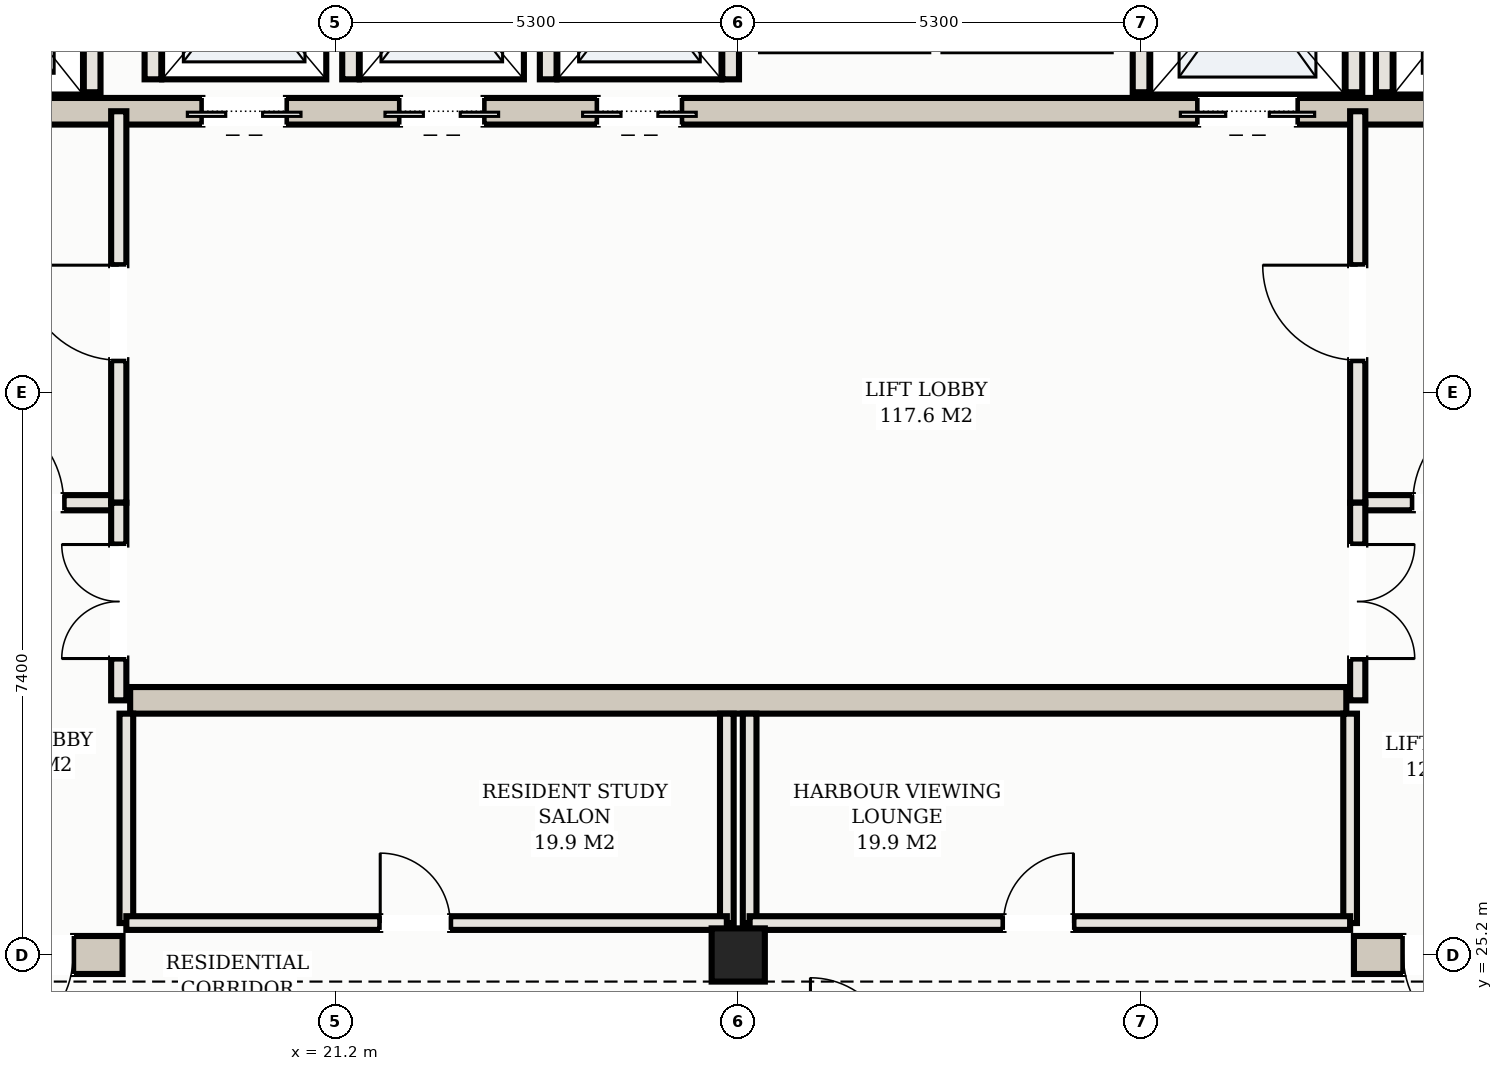
"""IFC4 building model, lengths in metres.
Left out: names, types, materials, properties, quantities, classifications, styles, units other than length and angle.
Written with IfcOpenShell. Run it as: python <this file> out.ifc"""

import sys

from ifc_helpers import new_model, si_unit, direction, frame, frame_2d, origin, origin_2d, place, context, subcontext, project, spatial, rectangle, hollow_rectangle, extrude, element, fill, save


model = new_model("IFC4")
c1 = context("Model", 3, precision=1e-05, world=origin(), true_north=direction((0.0, 1.0)))
c2 = subcontext(c1, "Body", "Model", "MODEL_VIEW")
j1 = project(units=[si_unit("LENGTHUNIT", "METRE"), si_unit("PLANEANGLEUNIT", "RADIAN")], contexts=[c1])
p1 = place(None, origin())
s1 = spatial("IfcSite", under=j1, at=p1, CompositionType="ELEMENT")
p2 = place(p1, origin())
s2 = spatial("IfcBuilding", under=s1, at=p2, CompositionType="ELEMENT")
p3 = place(p2, frame((0.0, 0.0, 249.5)))
s3 = spatial("IfcBuildingStorey", under=s2, at=p3, CompositionType="ELEMENT", Elevation=249.5)
p4 = place(p3, frame((10.35, 25.2, 0.0), z_axis=(0.0, 0.0, 1.0), x_axis=(1.0, 0.0, 0.0)))
e1 = element("IfcWall", 1, at=p4, inside=s3, PredefinedType="SHEAR", context=c2, shape_type="SweptSolid", body=[
    extrude(rectangle(XDim=8.05, YDim=0.5, at=frame_2d((4.025, 0.0))), origin(), (0.0, 0.0, 1.0), 3.11),
])
p5 = place(p4, frame((6.15, 0.0, 0.0)))
e2 = element("IfcOpeningElement", 2, at=p5, cuts=e1, PredefinedType="OPENING", context=c2, shape_type="SweptSolid", body=[
    extrude(rectangle(XDim=1.25, YDim=2.2, at=frame_2d((0.625, 1.1))), frame((0.0, 0.26, 0.0), z_axis=(0.0, -1.0, 0.0), x_axis=(1.0, 0.0, 0.0)), (0.0, 0.0, 1.0), 0.52),
])
p6 = place(p3, frame((34.6, 25.2, 0.0), z_axis=(0.0, 0.0, 1.0), x_axis=(1.0, 0.0, 0.0)))
e3 = element("IfcWall", 3, at=p6, inside=s3, PredefinedType="SHEAR", context=c2, shape_type="SweptSolid", body=[
    extrude(rectangle(XDim=8.05, YDim=0.5, at=frame_2d((4.025, 0.0))), origin(), (0.0, 0.0, 1.0), 3.11),
])
p7 = place(p6, frame((0.65, 0.0, 0.0)))
e4 = element("IfcOpeningElement", 4, at=p7, cuts=e3, PredefinedType="OPENING", context=c2, shape_type="SweptSolid", body=[
    extrude(rectangle(XDim=1.25, YDim=2.2, at=frame_2d((0.625, 1.1))), frame((0.0, 0.26, 0.0), z_axis=(0.0, -1.0, 0.0), x_axis=(1.0, 0.0, 0.0)), (0.0, 0.0, 1.0), 0.52),
])
p8 = place(p3, frame((15.5, 36.3, 0.0), z_axis=(0.0, 0.0, 1.0), x_axis=(1.0, 0.0, 0.0)))
e5 = element("IfcWall", 5, at=p8, inside=s3, PredefinedType="SHEAR", context=c2, shape_type="SweptSolid", body=[
    extrude(rectangle(XDim=22.0, YDim=0.35, at=frame_2d((11.0, 0.0))), origin(), (0.0, 0.0, 1.0), 3.11),
])
p9 = place(p8, frame((0.65, 0.0, 0.0)))
e6 = element("IfcOpeningElement", 6, at=p9, cuts=e5, PredefinedType="OPENING", context=c2, shape_type="SweptSolid", body=[
    extrude(rectangle(XDim=1.1, YDim=2.15, at=frame_2d((0.55, 1.075))), frame((0.0, 0.185, 0.0), z_axis=(0.0, -1.0, 0.0), x_axis=(1.0, 0.0, 0.0)), (0.0, 0.0, 1.0), 0.37),
])
p10 = place(p8, frame((20.25, 0.0, 0.0)))
e7 = element("IfcOpeningElement", 7, at=p10, cuts=e5, PredefinedType="OPENING", context=c2, shape_type="SweptSolid", body=[
    extrude(rectangle(XDim=1.1, YDim=2.15, at=frame_2d((0.55, 1.075))), frame((0.0, 0.185, 0.0), z_axis=(0.0, -1.0, 0.0), x_axis=(1.0, 0.0, 0.0)), (0.0, 0.0, 1.0), 0.37),
])
p11 = place(p8, frame((17.05, 0.0, 0.0)))
e8 = element("IfcOpeningElement", 8, at=p11, cuts=e5, PredefinedType="OPENING", context=c2, shape_type="SweptSolid", body=[
    extrude(rectangle(XDim=1.3, YDim=2.2, at=frame_2d((0.65, 1.1))), frame((0.0, 0.185, 0.0), z_axis=(0.0, -1.0, 0.0), x_axis=(1.0, 0.0, 0.0)), (0.0, 0.0, 1.0), 0.37),
])
p12 = place(p8, frame((3.95, 0.0, 0.0)))
e9 = element("IfcOpeningElement", 9, at=p12, cuts=e5, PredefinedType="OPENING", context=c2, shape_type="SweptSolid", body=[
    extrude(rectangle(XDim=1.1, YDim=2.15, at=frame_2d((0.55, 1.075))), frame((0.0, 0.185, 0.0), z_axis=(0.0, -1.0, 0.0), x_axis=(1.0, 0.0, 0.0)), (0.0, 0.0, 1.0), 0.37),
])
p13 = place(p8, frame((6.55, 0.0, 0.0)))
e10 = element("IfcOpeningElement", 10, at=p13, cuts=e5, PredefinedType="OPENING", context=c2, shape_type="SweptSolid", body=[
    extrude(rectangle(XDim=1.1, YDim=2.15, at=frame_2d((0.55, 1.075))), frame((0.0, 0.185, 0.0), z_axis=(0.0, -1.0, 0.0), x_axis=(1.0, 0.0, 0.0)), (0.0, 0.0, 1.0), 0.37),
])
p14 = place(p8, frame((9.15, 0.0, 0.0)))
e11 = element("IfcOpeningElement", 11, at=p14, cuts=e5, PredefinedType="OPENING", context=c2, shape_type="SweptSolid", body=[
    extrude(rectangle(XDim=1.1, YDim=2.15, at=frame_2d((0.55, 1.075))), frame((0.0, 0.185, 0.0), z_axis=(0.0, -1.0, 0.0), x_axis=(1.0, 0.0, 0.0)), (0.0, 0.0, 1.0), 0.37),
])
p15 = place(p3, frame((18.5, 28.55, 0.0), z_axis=(0.0, 0.0, 1.0), x_axis=(1.0, 0.0, 0.0)))
e12 = element("IfcWall", 12, at=p15, inside=s3, PredefinedType="SHEAR", context=c2, shape_type="SweptSolid", body=[
    extrude(rectangle(XDim=16.0, YDim=0.35, at=frame_2d((8.0, 0.0))), origin(), (0.0, 0.0, 1.0), 3.11),
])
p16 = place(p3, frame((26.5, 25.2, 0.0), z_axis=(0.0, 0.0, 1.0), x_axis=(1.0, 0.0, 0.0)))
e13 = element("IfcColumn", 13, at=p16, inside=s3, PredefinedType="COLUMN", context=c2, shape_type="SweptSolid", body=[
    extrude(hollow_rectangle(XDim=0.7, YDim=0.7, WallThickness=0.025, at=origin_2d()), origin(), (0.0, 0.0, 1.0), 3.3),
])
for number, where, z_axis, x_axis in (
    (14, (18.0, 36.55, 0.0), (0.0, 0.0, 1.0), (0.0, 1.0, 0.0)),
    (15, (35.0, 36.55, 0.0), (0.0, 0.0, 1.0), (0.0, 1.0, 0.0)),
    (16, (31.8, 36.55, 0.0), (0.0, 0.0, 1.0), (0.0, 1.0, 0.0)),
    (17, (34.6, 36.55, 0.0), (0.0, 0.0, 1.0), (0.0, 1.0, 0.0)),
):
    element("IfcWall", number, at=place(p3, frame(where, z_axis=z_axis, x_axis=x_axis)), inside=s3, PredefinedType="SOLIDWALL", context=c2, shape_type="SweptSolid", body=[
        extrude(rectangle(XDim=2.93, YDim=0.22, at=frame_2d((1.465, 0.0))), origin(), (0.0, 0.0, 1.0), 3.11),
    ])
for number, where, z_axis, x_axis in (
    (18, (18.8, 36.72, 0.0), (0.0, 0.0, 1.0), (0.0, 1.0, 0.0)),
    (19, (21.4, 36.72, 0.0), (0.0, 0.0, 1.0), (0.0, 1.0, 0.0)),
    (20, (24.0, 36.72, 0.0), (0.0, 0.0, 1.0), (0.0, 1.0, 0.0)),
    (21, (26.4, 36.72, 0.0), (0.0, 0.0, 1.0), (0.0, 1.0, 0.0)),
):
    element("IfcWall", number, at=place(p3, frame(where, z_axis=z_axis, x_axis=x_axis)), inside=s3, PredefinedType="SOLIDWALL", context=c2, shape_type="SweptSolid", body=[
        extrude(rectangle(XDim=2.56, YDim=0.22, at=frame_2d((1.28, 0.0))), origin(), (0.0, 0.0, 1.0), 3.11),
    ])
p17 = place(p3, frame((15.1, 31.15, 0.0), z_axis=(0.0, 0.0, 1.0), x_axis=(1.0, 0.0, 0.0)))
e22 = element("IfcWall", 22, at=p17, inside=s3, PredefinedType="PARTITIONING", context=c2, shape_type="SweptSolid", body=[
    extrude(rectangle(XDim=3.25, YDim=0.2, at=frame_2d((1.625, 0.0))), origin(), (0.0, 0.0, 1.0), 2.45),
])
p18 = place(p17, frame((1.275, 0.0, 0.0)))
e23 = element("IfcOpeningElement", 23, at=p18, cuts=e22, PredefinedType="OPENING", context=c2, shape_type="SweptSolid", body=[
    extrude(rectangle(XDim=1.25, YDim=2.2, at=frame_2d((0.625, 1.1))), frame((0.0, 0.11, 0.0), z_axis=(0.0, -1.0, 0.0), x_axis=(1.0, 0.0, 0.0)), (0.0, 0.0, 1.0), 0.22),
])
p19 = place(p3, frame((18.35, 31.15, 0.0), z_axis=(0.0, 0.0, 1.0), x_axis=(0.0, 1.0, 0.0)))
e24 = element("IfcWall", 24, at=p19, inside=s3, PredefinedType="PARTITIONING", context=c2, shape_type="SweptSolid", body=[
    extrude(rectangle(XDim=5.15, YDim=0.2, at=frame_2d((2.575, 0.0))), origin(), (0.0, 0.0, 1.0), 2.45),
])
p20 = place(p19, frame((1.875, 0.0, 0.0)))
e25 = element("IfcOpeningElement", 25, at=p20, cuts=e24, PredefinedType="OPENING", context=c2, shape_type="SweptSolid", body=[
    extrude(rectangle(XDim=1.25, YDim=2.2, at=frame_2d((0.625, 1.1))), frame((0.0, 0.11, 0.0), z_axis=(0.0, -1.0, 0.0), x_axis=(1.0, 0.0, 0.0)), (0.0, 0.0, 1.0), 0.22),
])
p21 = place(p3, frame((34.65, 31.15, 0.0), z_axis=(0.0, 0.0, 1.0), x_axis=(1.0, 0.0, 0.0)))
e26 = element("IfcWall", 26, at=p21, inside=s3, PredefinedType="PARTITIONING", context=c2, shape_type="SweptSolid", body=[
    extrude(rectangle(XDim=3.25, YDim=0.2, at=frame_2d((1.625, 0.0))), origin(), (0.0, 0.0, 1.0), 2.45),
])
p22 = place(p21, frame((0.725, 0.0, 0.0)))
e27 = element("IfcOpeningElement", 27, at=p22, cuts=e26, PredefinedType="OPENING", context=c2, shape_type="SweptSolid", body=[
    extrude(rectangle(XDim=1.25, YDim=2.2, at=frame_2d((0.625, 1.1))), frame((0.0, 0.11, 0.0), z_axis=(0.0, -1.0, 0.0), x_axis=(1.0, 0.0, 0.0)), (0.0, 0.0, 1.0), 0.22),
])
p23 = place(p3, frame((34.65, 31.15, 0.0), z_axis=(0.0, 0.0, 1.0), x_axis=(0.0, 1.0, 0.0)))
e28 = element("IfcWall", 28, at=p23, inside=s3, PredefinedType="PARTITIONING", context=c2, shape_type="SweptSolid", body=[
    extrude(rectangle(XDim=5.15, YDim=0.2, at=frame_2d((2.575, 0.0))), origin(), (0.0, 0.0, 1.0), 2.45),
])
p24 = place(p23, frame((1.875, 0.0, 0.0)))
e29 = element("IfcOpeningElement", 29, at=p24, cuts=e28, PredefinedType="OPENING", context=c2, shape_type="SweptSolid", body=[
    extrude(rectangle(XDim=1.25, YDim=2.2, at=frame_2d((0.625, 1.1))), frame((0.0, 0.11, 0.0), z_axis=(0.0, -1.0, 0.0), x_axis=(1.0, 0.0, 0.0)), (0.0, 0.0, 1.0), 0.22),
])
p25 = place(p3, frame((18.35, 28.55, 0.0), z_axis=(0.0, 0.0, 1.0), x_axis=(0.0, 1.0, 0.0)))
e30 = element("IfcWall", 30, at=p25, inside=s3, PredefinedType="PARTITIONING", context=c2, shape_type="SweptSolid", body=[
    extrude(rectangle(XDim=2.6, YDim=0.2, at=frame_2d((1.3, 0.0))), origin(), (0.0, 0.0, 1.0), 2.45),
])
p26 = place(p25, frame((0.55, 0.0, 0.0)))
e31 = element("IfcOpeningElement", 31, at=p26, cuts=e30, PredefinedType="OPENING", context=c2, shape_type="SweptSolid", body=[
    extrude(rectangle(XDim=1.5, YDim=2.25, at=frame_2d((0.75, 1.125))), frame((0.0, 0.11, 0.0), z_axis=(0.0, -1.0, 0.0), x_axis=(1.0, 0.0, 0.0)), (0.0, 0.0, 1.0), 0.22),
])
p27 = place(p3, frame((34.65, 28.55, 0.0), z_axis=(0.0, 0.0, 1.0), x_axis=(0.0, 1.0, 0.0)))
e32 = element("IfcWall", 32, at=p27, inside=s3, PredefinedType="PARTITIONING", context=c2, shape_type="SweptSolid", body=[
    extrude(rectangle(XDim=2.6, YDim=0.2, at=frame_2d((1.3, 0.0))), origin(), (0.0, 0.0, 1.0), 2.45),
])
p28 = place(p27, frame((0.55, 0.0, 0.0)))
e33 = element("IfcOpeningElement", 33, at=p28, cuts=e32, PredefinedType="OPENING", context=c2, shape_type="SweptSolid", body=[
    extrude(rectangle(XDim=1.5, YDim=2.25, at=frame_2d((0.75, 1.125))), frame((0.0, 0.11, 0.0), z_axis=(0.0, -1.0, 0.0), x_axis=(1.0, 0.0, 0.0)), (0.0, 0.0, 1.0), 0.22),
])
for number, where, z_axis, x_axis in (
    (34, (18.45, 25.62, 0.0), (0.0, 0.0, 1.0), (0.0, 1.0, 0.0)),
    (35, (26.35, 25.62, 0.0), (0.0, 0.0, 1.0), (0.0, 1.0, 0.0)),
):
    element("IfcWall", number, at=place(p3, frame(where, z_axis=z_axis, x_axis=x_axis)), inside=s3, PredefinedType="PARTITIONING", context=c2, shape_type="SweptSolid", body=[
        extrude(rectangle(XDim=2.755, YDim=0.18, at=frame_2d((1.377, 0.0))), origin(), (0.0, 0.0, 1.0), 2.45),
    ])
p29 = place(p3, frame((18.45, 25.62, 0.0), z_axis=(0.0, 0.0, 1.0), x_axis=(1.0, 0.0, 0.0)))
e36 = element("IfcWall", 36, at=p29, inside=s3, PredefinedType="PARTITIONING", context=c2, shape_type="SweptSolid", body=[
    extrude(rectangle(XDim=7.9, YDim=0.18, at=frame_2d((3.95, 0.0))), origin(), (0.0, 0.0, 1.0), 2.45),
])
p30 = place(p29, frame((3.34, 0.0, 0.0)))
e37 = element("IfcOpeningElement", 37, at=p30, cuts=e36, PredefinedType="OPENING", context=c2, shape_type="SweptSolid", body=[
    extrude(rectangle(XDim=0.92, YDim=2.15, at=frame_2d((0.46, 1.075))), frame((0.0, 0.1, 0.0), z_axis=(0.0, -1.0, 0.0), x_axis=(1.0, 0.0, 0.0)), (0.0, 0.0, 1.0), 0.2),
])
for number, where, z_axis, x_axis in (
    (38, (26.65, 25.62, 0.0), (0.0, 0.0, 1.0), (0.0, 1.0, 0.0)),
    (39, (34.55, 25.62, 0.0), (0.0, 0.0, 1.0), (0.0, 1.0, 0.0)),
):
    element("IfcWall", number, at=place(p3, frame(where, z_axis=z_axis, x_axis=x_axis)), inside=s3, PredefinedType="PARTITIONING", context=c2, shape_type="SweptSolid", body=[
        extrude(rectangle(XDim=2.755, YDim=0.18, at=frame_2d((1.377, 0.0))), origin(), (0.0, 0.0, 1.0), 2.45),
    ])
p31 = place(p3, frame((26.65, 25.62, 0.0), z_axis=(0.0, 0.0, 1.0), x_axis=(1.0, 0.0, 0.0)))
e40 = element("IfcWall", 40, at=p31, inside=s3, PredefinedType="PARTITIONING", context=c2, shape_type="SweptSolid", body=[
    extrude(rectangle(XDim=7.9, YDim=0.18, at=frame_2d((3.95, 0.0))), origin(), (0.0, 0.0, 1.0), 2.45),
])
p32 = place(p31, frame((3.34, 0.0, 0.0)))
e41 = element("IfcOpeningElement", 41, at=p32, cuts=e40, PredefinedType="OPENING", context=c2, shape_type="SweptSolid", body=[
    extrude(rectangle(XDim=0.92, YDim=2.15, at=frame_2d((0.46, 1.075))), frame((0.0, 0.1, 0.0), z_axis=(0.0, -1.0, 0.0), x_axis=(1.0, 0.0, 0.0)), (0.0, 0.0, 1.0), 0.2),
])
p33 = place(p11, frame((1.3, 0.0, 0.0), z_axis=(0.0, 0.0, 1.0), x_axis=(-1.0, 0.0, 0.0)))
e42 = element("IfcDoor", 42, at=p33, inside=s3, OperationType="DOUBLE_DOOR_SLIDING", PredefinedType="DOOR", context=c2, shape_type="SweptSolid", body=[
    extrude(rectangle(XDim=1.3, YDim=2.2, at=frame_2d((0.65, 1.1))), frame((0.0, 0.025, 0.0), z_axis=(0.0, -1.0, 0.0), x_axis=(1.0, 0.0, 0.0)), (0.0, 0.0, 1.0), 0.05),
])
fill(e8, e42)
p34 = place(p12, frame((1.1, 0.0, 0.0), z_axis=(0.0, 0.0, 1.0), x_axis=(-1.0, 0.0, 0.0)))
e43 = element("IfcDoor", 43, at=p34, inside=s3, OperationType="DOUBLE_DOOR_SLIDING", PredefinedType="DOOR", context=c2, shape_type="SweptSolid", body=[
    extrude(rectangle(XDim=1.1, YDim=2.15, at=frame_2d((0.55, 1.075))), frame((0.0, 0.025, 0.0), z_axis=(0.0, -1.0, 0.0), x_axis=(1.0, 0.0, 0.0)), (0.0, 0.0, 1.0), 0.05),
])
fill(e9, e43)
p35 = place(p13, frame((1.1, 0.0, 0.0), z_axis=(0.0, 0.0, 1.0), x_axis=(-1.0, 0.0, 0.0)))
e44 = element("IfcDoor", 44, at=p35, inside=s3, OperationType="DOUBLE_DOOR_SLIDING", PredefinedType="DOOR", context=c2, shape_type="SweptSolid", body=[
    extrude(rectangle(XDim=1.1, YDim=2.15, at=frame_2d((0.55, 1.075))), frame((0.0, 0.025, 0.0), z_axis=(0.0, -1.0, 0.0), x_axis=(1.0, 0.0, 0.0)), (0.0, 0.0, 1.0), 0.05),
])
fill(e10, e44)
p36 = place(p14, frame((1.1, 0.0, 0.0), z_axis=(0.0, 0.0, 1.0), x_axis=(-1.0, 0.0, 0.0)))
e45 = element("IfcDoor", 45, at=p36, inside=s3, OperationType="DOUBLE_DOOR_SLIDING", PredefinedType="DOOR", context=c2, shape_type="SweptSolid", body=[
    extrude(rectangle(XDim=1.1, YDim=2.15, at=frame_2d((0.55, 1.075))), frame((0.0, 0.025, 0.0), z_axis=(0.0, -1.0, 0.0), x_axis=(1.0, 0.0, 0.0)), (0.0, 0.0, 1.0), 0.05),
])
fill(e11, e45)
p37 = place(p5, frame((1.25, 0.0, 0.0), z_axis=(0.0, 0.0, 1.0), x_axis=(-1.0, 0.0, 0.0)))
e46 = element("IfcDoor", 46, at=p37, inside=s3, OperationType="SINGLE_SWING_RIGHT", PredefinedType="DOOR", context=c2, shape_type="SweptSolid", body=[
    extrude(rectangle(XDim=1.25, YDim=2.2, at=frame_2d((0.625, 1.1))), frame((0.0, 0.025, 0.0), z_axis=(0.0, -1.0, 0.0), x_axis=(1.0, 0.0, 0.0)), (0.0, 0.0, 1.0), 0.05),
])
fill(e2, e46)
p38 = place(p7, frame((1.25, 0.0, 0.0), z_axis=(0.0, 0.0, 1.0), x_axis=(-1.0, 0.0, 0.0)))
e47 = element("IfcDoor", 47, at=p38, inside=s3, OperationType="SINGLE_SWING_LEFT", PredefinedType="DOOR", context=c2, shape_type="SweptSolid", body=[
    extrude(rectangle(XDim=1.25, YDim=2.2, at=frame_2d((0.625, 1.1))), frame((0.0, 0.025, 0.0), z_axis=(0.0, -1.0, 0.0), x_axis=(1.0, 0.0, 0.0)), (0.0, 0.0, 1.0), 0.05),
])
fill(e4, e47)
p39 = place(p18, origin())
e48 = element("IfcDoor", 48, at=p39, inside=s3, OperationType="SINGLE_SWING_LEFT", PredefinedType="DOOR", context=c2, shape_type="SweptSolid", body=[
    extrude(rectangle(XDim=1.25, YDim=2.2, at=frame_2d((0.625, 1.1))), frame((0.0, 0.025, 0.0), z_axis=(0.0, -1.0, 0.0), x_axis=(1.0, 0.0, 0.0)), (0.0, 0.0, 1.0), 0.05),
])
fill(e23, e48)
p40 = place(p20, origin())
e49 = element("IfcDoor", 49, at=p40, inside=s3, OperationType="SINGLE_SWING_RIGHT", PredefinedType="DOOR", context=c2, shape_type="SweptSolid", body=[
    extrude(rectangle(XDim=1.25, YDim=2.2, at=frame_2d((0.625, 1.1))), frame((0.0, 0.025, 0.0), z_axis=(0.0, -1.0, 0.0), x_axis=(1.0, 0.0, 0.0)), (0.0, 0.0, 1.0), 0.05),
])
fill(e25, e49)
p41 = place(p22, origin())
e50 = element("IfcDoor", 50, at=p41, inside=s3, OperationType="SINGLE_SWING_RIGHT", PredefinedType="DOOR", context=c2, shape_type="SweptSolid", body=[
    extrude(rectangle(XDim=1.25, YDim=2.2, at=frame_2d((0.625, 1.1))), frame((0.0, 0.025, 0.0), z_axis=(0.0, -1.0, 0.0), x_axis=(1.0, 0.0, 0.0)), (0.0, 0.0, 1.0), 0.05),
])
fill(e27, e50)
p42 = place(p24, origin())
e51 = element("IfcDoor", 51, at=p42, inside=s3, OperationType="SINGLE_SWING_RIGHT", PredefinedType="DOOR", context=c2, shape_type="SweptSolid", body=[
    extrude(rectangle(XDim=1.25, YDim=2.2, at=frame_2d((0.625, 1.1))), frame((0.0, 0.025, 0.0), z_axis=(0.0, -1.0, 0.0), x_axis=(1.0, 0.0, 0.0)), (0.0, 0.0, 1.0), 0.05),
])
fill(e29, e51)
p43 = place(p26, origin())
e52 = element("IfcDoor", 52, at=p43, inside=s3, OperationType="DOUBLE_DOOR_SINGLE_SWING", PredefinedType="DOOR", context=c2, shape_type="SweptSolid", body=[
    extrude(rectangle(XDim=1.5, YDim=2.25, at=frame_2d((0.75, 1.125))), frame((0.0, 0.025, 0.0), z_axis=(0.0, -1.0, 0.0), x_axis=(1.0, 0.0, 0.0)), (0.0, 0.0, 1.0), 0.05),
])
fill(e31, e52)
p44 = place(p28, frame((1.5, 0.0, 0.0), z_axis=(0.0, 0.0, 1.0), x_axis=(-1.0, 0.0, 0.0)))
e53 = element("IfcDoor", 53, at=p44, inside=s3, OperationType="DOUBLE_DOOR_SINGLE_SWING", PredefinedType="DOOR", context=c2, shape_type="SweptSolid", body=[
    extrude(rectangle(XDim=1.5, YDim=2.25, at=frame_2d((0.75, 1.125))), frame((0.0, 0.025, 0.0), z_axis=(0.0, -1.0, 0.0), x_axis=(1.0, 0.0, 0.0)), (0.0, 0.0, 1.0), 0.05),
])
fill(e33, e53)
p45 = place(p30, origin())
e54 = element("IfcDoor", 54, at=p45, inside=s3, OperationType="SINGLE_SWING_LEFT", PredefinedType="DOOR", context=c2, shape_type="SweptSolid", body=[
    extrude(rectangle(XDim=0.92, YDim=2.15, at=frame_2d((0.46, 1.075))), frame((0.0, 0.025, 0.0), z_axis=(0.0, -1.0, 0.0), x_axis=(1.0, 0.0, 0.0)), (0.0, 0.0, 1.0), 0.05),
])
fill(e37, e54)
p46 = place(p32, origin())
e55 = element("IfcDoor", 55, at=p46, inside=s3, OperationType="SINGLE_SWING_RIGHT", PredefinedType="DOOR", context=c2, shape_type="SweptSolid", body=[
    extrude(rectangle(XDim=0.92, YDim=2.15, at=frame_2d((0.46, 1.075))), frame((0.0, 0.025, 0.0), z_axis=(0.0, -1.0, 0.0), x_axis=(1.0, 0.0, 0.0)), (0.0, 0.0, 1.0), 0.05),
])
fill(e41, e55)
save(model, sys.argv[1])
